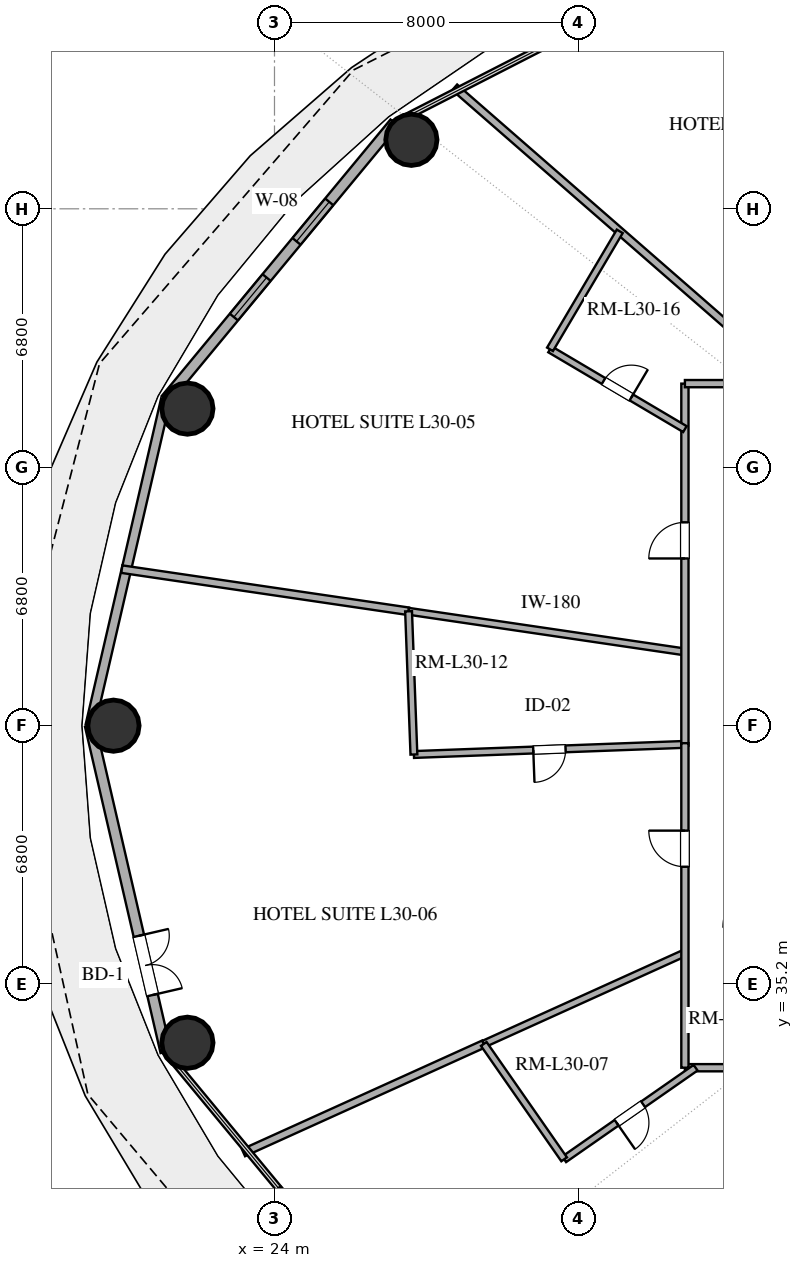
"""IFC4 building model, lengths in metres.
Left out: names, types, materials, properties, quantities, classifications, styles, units other than length and angle.
Written with IfcOpenShell. Run it as: python <this file> out.ifc"""

import sys

from ifc_helpers import new_model, si_unit, direction, frame, frame_2d, origin, origin_2d, place, context, subcontext, project, spatial, rectangle, hollow_circle, extrude, element, fill, save


model = new_model("IFC4")
c1 = context("Model", 3, precision=1e-05, world=origin(), true_north=direction((0.0, 1.0)))
c2 = subcontext(c1, "Body", "Model", "MODEL_VIEW")
j1 = project(units=[si_unit("LENGTHUNIT", "METRE"), si_unit("PLANEANGLEUNIT", "RADIAN")], contexts=[c1])
p1 = place(None, origin())
s1 = spatial("IfcSite", under=j1, at=p1, CompositionType="ELEMENT")
p2 = place(p1, origin())
s2 = spatial("IfcBuilding", under=s1, at=p2, CompositionType="ELEMENT")
p3 = place(p2, frame((0.0, 0.0, 120.0)))
s3 = spatial("IfcBuildingStorey", under=s2, at=p3, CompositionType="ELEMENT", Elevation=120.0)
for number, where, z_axis, x_axis in (
    (1, (27.602, 57.415, 0.0), (0.0, 0.0, 1.0), (1.0, 0.0, 0.0)),
    (2, (21.709, 50.343, 0.0), (0.0, 0.0, 1.0), (1.0, 0.0, 0.0)),
    (3, (19.763, 42.0, 0.0), (0.0, 0.0, 1.0), (1.0, 0.0, 0.0)),
    (4, (21.709, 33.657, 0.0), (0.0, 0.0, 1.0), (1.0, 0.0, 0.0)),
):
    element("IfcColumn", number, at=place(p3, frame(where, z_axis=z_axis, x_axis=x_axis)), inside=s3, PredefinedType="COLUMN", context=c2, shape_type="SweptSolid", body=[
        extrude(hollow_circle(Radius=0.675, WallThickness=0.036, at=origin_2d()), origin(), (0.0, 0.0, 1.0), 3.38),
    ])
p4 = place(p3, frame((27.16, 57.86, 0.0), z_axis=(0.0, 0.0, 1.0), x_axis=(-0.637505817448, -0.770445541696, 0.0)))
e5 = element("IfcWall", 5, at=p4, inside=s3, PredefinedType="SOLIDWALL", context=c2, shape_type="SweptSolid", body=[
    extrude(rectangle(XDim=9.445, YDim=0.28, at=frame_2d((4.723, 0.0))), origin(), (0.0, 0.0, 1.0), 3.38),
])
p5 = place(p4, frame((2.697, 0.0, 0.85)))
e6 = element("IfcOpeningElement", 6, at=p5, cuts=e5, PredefinedType="OPENING", context=c2, shape_type="SweptSolid", body=[
    extrude(rectangle(XDim=1.35, YDim=1.8, at=frame_2d((0.675, 0.9))), frame((0.0, 0.15, 0.0), z_axis=(0.0, -1.0, 0.0), x_axis=(1.0, 0.0, 0.0)), (0.0, 0.0, 1.0), 0.3),
])
p6 = place(p4, frame((5.282, 0.0, 0.85)))
e7 = element("IfcOpeningElement", 7, at=p6, cuts=e5, PredefinedType="OPENING", context=c2, shape_type="SweptSolid", body=[
    extrude(rectangle(XDim=1.35, YDim=1.8, at=frame_2d((0.675, 0.9))), frame((0.0, 0.15, 0.0), z_axis=(0.0, -1.0, 0.0), x_axis=(1.0, 0.0, 0.0)), (0.0, 0.0, 1.0), 0.3),
])
p7 = place(p3, frame((21.139, 50.583, 0.0), z_axis=(0.0, 0.0, 1.0), x_axis=(-0.22558597182, -0.974223264616, 0.0)))
e8 = element("IfcWall", 8, at=p7, inside=s3, PredefinedType="SOLIDWALL", context=c2, shape_type="SweptSolid", body=[
    extrude(rectangle(XDim=8.811, YDim=0.25, at=frame_2d((4.405, 0.0))), origin(), (0.0, 0.0, 1.0), 3.38),
])
p8 = place(p3, frame((19.151, 42.0, 0.0), z_axis=(0.0, 0.0, 1.0), x_axis=(0.22558597182, -0.974223264616, 0.0)))
e9 = element("IfcWall", 9, at=p8, inside=s3, PredefinedType="SOLIDWALL", context=c2, shape_type="SweptSolid", body=[
    extrude(rectangle(XDim=8.811, YDim=0.28, at=frame_2d((4.405, 0.0))), origin(), (0.0, 0.0, 1.0), 3.38),
])
p9 = place(p8, frame((5.675, 0.0, 0.0)))
e10 = element("IfcOpeningElement", 10, at=p9, cuts=e9, PredefinedType="OPENING", context=c2, shape_type="SweptSolid", body=[
    extrude(rectangle(XDim=1.6, YDim=2.25, at=frame_2d((0.8, 1.125))), frame((0.0, 0.15, 0.0), z_axis=(0.0, -1.0, 0.0), x_axis=(1.0, 0.0, 0.0)), (0.0, 0.0, 1.0), 0.3),
])
p10 = place(p3, frame((35.037, 21.969, 0.0), z_axis=(0.0, 0.0, 1.0), x_axis=(0.543298274368, 0.839539745973, 0.0)))
e11 = element("IfcWall", 11, at=p10, inside=s3, PredefinedType="PARTITIONING", context=c2, shape_type="SweptSolid", body=[
    extrude(rectangle(XDim=13.139, YDim=0.2, at=frame_2d((6.57, 0.0))), origin(), (0.0, 0.0, 1.0), 2.74),
])
p11 = place(p3, frame((19.982, 46.119, 0.0), z_axis=(0.0, 0.0, 1.0), x_axis=(0.989365774641, -0.14544883626, 0.0)))
e12 = element("IfcWall", 12, at=p11, inside=s3, PredefinedType="PARTITIONING", context=c2, shape_type="SweptSolid", body=[
    extrude(rectangle(XDim=7.627, YDim=0.2, at=frame_2d((3.813, 0.0))), origin(), (0.0, 0.0, 1.0), 2.74),
])
p12 = place(p3, frame((27.528, 45.01, 0.0), z_axis=(0.0, 0.0, 1.0), x_axis=(0.989364619243, -0.145456695238, 0.0)))
e13 = element("IfcWall", 13, at=p12, inside=s3, PredefinedType="PLUMBINGWALL", context=c2, shape_type="SweptSolid", body=[
    extrude(rectangle(XDim=7.35, YDim=0.18, at=frame_2d((3.675, 0.0))), origin(), (0.0, 0.0, 1.0), 2.74),
])
p13 = place(p3, frame((49.671, 33.0, 0.0), z_axis=(0.0, 0.0, 1.0), x_axis=(-1.0, 0.0, 0.0)))
e14 = element("IfcWall", 14, at=p13, inside=s3, PredefinedType="PARTITIONING", context=c2, shape_type="SweptSolid", body=[
    extrude(rectangle(XDim=14.871, YDim=0.19, at=frame_2d((7.436, 0.0))), origin(), (0.0, 0.0, 1.0), 2.74),
])
p14 = place(p13, frame((10.576, 0.0, 0.0)))
e15 = element("IfcOpeningElement", 15, at=p14, cuts=e14, PredefinedType="OPENING", context=c2, shape_type="SweptSolid", body=[
    extrude(rectangle(XDim=0.95, YDim=2.15, at=frame_2d((0.475, 1.075))), frame((0.0, 0.105, 0.0), z_axis=(0.0, -1.0, 0.0), x_axis=(1.0, 0.0, 0.0)), (0.0, 0.0, 1.0), 0.21),
])
p15 = place(p13, frame((4.101, 0.0, 0.0)))
e16 = element("IfcOpeningElement", 16, at=p15, cuts=e14, PredefinedType="OPENING", context=c2, shape_type="SweptSolid", body=[
    extrude(rectangle(XDim=1.0, YDim=2.2, at=frame_2d((0.5, 1.1))), frame((0.0, 0.105, 0.0), z_axis=(0.0, -1.0, 0.0), x_axis=(1.0, 0.0, 0.0)), (0.0, 0.0, 1.0), 0.21),
])
p16 = place(p3, frame((34.8, 41.508, 0.0), z_axis=(0.0, 0.0, 1.0), x_axis=(-0.999305711591, -0.037257144028, 0.0)))
e17 = element("IfcWall", 17, at=p16, inside=s3, PredefinedType="PLUMBINGWALL", context=c2, shape_type="SweptSolid", body=[
    extrude(rectangle(XDim=7.136, YDim=0.18, at=frame_2d((3.568, 0.0))), origin(), (0.0, 0.0, 1.0), 2.74),
])
p17 = place(p16, frame((3.143, 0.0, 0.0)))
e18 = element("IfcOpeningElement", 18, at=p17, cuts=e17, PredefinedType="OPENING", context=c2, shape_type="SweptSolid", body=[
    extrude(rectangle(XDim=0.85, YDim=2.1, at=frame_2d((0.425, 1.05))), frame((0.0, 0.1, 0.0), z_axis=(0.0, -1.0, 0.0), x_axis=(1.0, 0.0, 0.0)), (0.0, 0.0, 1.0), 0.2),
])
p18 = place(p3, frame((23.185, 30.762, 0.0), z_axis=(0.0, 0.0, 1.0), x_axis=(0.910940213411, 0.412538395292, 0.0)))
e19 = element("IfcWall", 19, at=p18, inside=s3, PredefinedType="PARTITIONING", context=c2, shape_type="SweptSolid", body=[
    extrude(rectangle(XDim=6.941, YDim=0.2, at=frame_2d((3.47, 0.0))), origin(), (0.0, 0.0, 1.0), 2.74),
])
p19 = place(p3, frame((37.68, 51.0, 0.0), z_axis=(0.0, 0.0, 1.0), x_axis=(-0.753659518717, 0.657265037749, 0.0)))
e20 = element("IfcWall", 20, at=p19, inside=s3, PredefinedType="PARTITIONING", context=c2, shape_type="SweptSolid", body=[
    extrude(rectangle(XDim=11.861, YDim=0.2, at=frame_2d((5.93, 0.0))), origin(), (0.0, 0.0, 1.0), 2.74),
])
p20 = place(p3, frame((34.8, 41.476, 0.0), z_axis=(0.0, 0.0, 1.0), x_axis=(0.0, 1.0, 0.0)))
e21 = element("IfcWall", 21, at=p20, inside=s3, PredefinedType="PARTITIONING", context=c2, shape_type="SweptSolid", body=[
    extrude(rectangle(XDim=9.524, YDim=0.19, at=frame_2d((4.762, 0.0))), origin(), (0.0, 0.0, 1.0), 2.74),
])
p21 = place(p20, frame((4.924, 0.0, 0.0)))
e22 = element("IfcOpeningElement", 22, at=p21, cuts=e21, PredefinedType="OPENING", context=c2, shape_type="SweptSolid", body=[
    extrude(rectangle(XDim=0.95, YDim=2.15, at=frame_2d((0.475, 1.075))), frame((0.0, 0.105, 0.0), z_axis=(0.0, -1.0, 0.0), x_axis=(1.0, 0.0, 0.0)), (0.0, 0.0, 1.0), 0.21),
])
p22 = place(p3, frame((34.8, 51.0, 0.0), z_axis=(0.0, 0.0, 1.0), x_axis=(1.0, 0.0, 0.0)))
e23 = element("IfcWall", 23, at=p22, inside=s3, PredefinedType="PARTITIONING", context=c2, shape_type="SweptSolid", body=[
    extrude(rectangle(XDim=10.622, YDim=0.19, at=frame_2d((5.311, 0.0))), origin(), (0.0, 0.0, 1.0), 2.74),
])
p23 = place(p22, frame((5.297, 0.0, 0.0)))
e24 = element("IfcOpeningElement", 24, at=p23, cuts=e23, PredefinedType="OPENING", context=c2, shape_type="SweptSolid", body=[
    extrude(rectangle(XDim=0.95, YDim=2.15, at=frame_2d((0.475, 1.075))), frame((0.0, 0.105, 0.0), z_axis=(0.0, -1.0, 0.0), x_axis=(1.0, 0.0, 0.0)), (0.0, 0.0, 1.0), 0.21),
])
p24 = place(p3, frame((29.507, 33.625, 0.0), z_axis=(0.0, 0.0, 1.0), x_axis=(0.910959840523, 0.412495053248, 0.0)))
e25 = element("IfcWall", 25, at=p24, inside=s3, PredefinedType="PLUMBINGWALL", context=c2, shape_type="SweptSolid", body=[
    extrude(rectangle(XDim=5.81, YDim=0.18, at=frame_2d((2.905, 0.0))), origin(), (0.0, 0.0, 1.0), 2.74),
])
p25 = place(p3, frame((34.8, 33.0, 0.0), z_axis=(0.0, 0.0, 1.0), x_axis=(0.0, 1.0, 0.0)))
e26 = element("IfcWall", 26, at=p25, inside=s3, PredefinedType="PARTITIONING", context=c2, shape_type="SweptSolid", body=[
    extrude(rectangle(XDim=8.54, YDim=0.19, at=frame_2d((4.27, 0.0))), origin(), (0.0, 0.0, 1.0), 2.74),
])
p26 = place(p25, frame((5.288, 0.0, 0.0)))
e27 = element("IfcOpeningElement", 27, at=p26, cuts=e26, PredefinedType="OPENING", context=c2, shape_type="SweptSolid", body=[
    extrude(rectangle(XDim=0.95, YDim=2.15, at=frame_2d((0.475, 1.075))), frame((0.0, 0.105, 0.0), z_axis=(0.0, -1.0, 0.0), x_axis=(1.0, 0.0, 0.0)), (0.0, 0.0, 1.0), 0.21),
])
p27 = place(p3, frame((35.081, 33.0, 0.0), z_axis=(0.0, 0.0, 1.0), x_axis=(-0.820508449427, -0.571634397512, 0.0)))
e28 = element("IfcWall", 28, at=p27, inside=s3, PredefinedType="PLUMBINGWALL", context=c2, shape_type="SweptSolid", body=[
    extrude(rectangle(XDim=4.216, YDim=0.18, at=frame_2d((2.108, 0.0))), origin(), (0.0, 0.0, 1.0), 2.74),
])
p28 = place(p27, frame((1.683, 0.0, 0.0)))
e29 = element("IfcOpeningElement", 29, at=p28, cuts=e28, PredefinedType="OPENING", context=c2, shape_type="SweptSolid", body=[
    extrude(rectangle(XDim=0.85, YDim=2.1, at=frame_2d((0.425, 1.05))), frame((0.0, 0.1, 0.0), z_axis=(0.0, -1.0, 0.0), x_axis=(1.0, 0.0, 0.0)), (0.0, 0.0, 1.0), 0.2),
])
p29 = place(p3, frame((31.25, 51.902, 0.0), z_axis=(0.0, 0.0, 1.0), x_axis=(0.860833406846, -0.508886869214, 0.0)))
e30 = element("IfcWall", 30, at=p29, inside=s3, PredefinedType="PLUMBINGWALL", context=c2, shape_type="SweptSolid", body=[
    extrude(rectangle(XDim=4.124, YDim=0.18, at=frame_2d((2.062, 0.0))), origin(), (0.0, 0.0, 1.0), 2.74),
])
p30 = place(p29, frame((1.637, 0.0, 0.0)))
e31 = element("IfcOpeningElement", 31, at=p30, cuts=e30, PredefinedType="OPENING", context=c2, shape_type="SweptSolid", body=[
    extrude(rectangle(XDim=0.85, YDim=2.1, at=frame_2d((0.425, 1.05))), frame((0.0, 0.1, 0.0), z_axis=(0.0, -1.0, 0.0), x_axis=(1.0, 0.0, 0.0)), (0.0, 0.0, 1.0), 0.2),
])
p31 = place(p3, frame((27.669, 41.242, 0.0), z_axis=(0.0, 0.0, 1.0), x_axis=(-0.037294239527, 0.999304327869, 0.0)))
e32 = element("IfcWall", 32, at=p31, inside=s3, PredefinedType="PLUMBINGWALL", context=c2, shape_type="SweptSolid", body=[
    extrude(rectangle(XDim=3.771, YDim=0.18, at=frame_2d((1.885, 0.0))), origin(), (0.0, 0.0, 1.0), 2.74),
])
p32 = place(p3, frame((31.622, 30.59, 0.0), z_axis=(0.0, 0.0, 1.0), x_axis=(-0.571609603384, 0.820525722521, 0.0)))
e33 = element("IfcWall", 33, at=p32, inside=s3, PredefinedType="PLUMBINGWALL", context=c2, shape_type="SweptSolid", body=[
    extrude(rectangle(XDim=3.7, YDim=0.18, at=frame_2d((1.85, 0.0))), origin(), (0.0, 0.0, 1.0), 2.74),
])
p33 = place(p3, frame((33.085, 55.007, 0.0), z_axis=(0.0, 0.0, 1.0), x_axis=(-0.508909491775, -0.860820032981, 0.0)))
e34 = element("IfcWall", 34, at=p33, inside=s3, PredefinedType="PLUMBINGWALL", context=c2, shape_type="SweptSolid", body=[
    extrude(rectangle(XDim=3.606, YDim=0.18, at=frame_2d((1.803, 0.0))), origin(), (0.0, 0.0, 1.0), 2.74),
])
p34 = place(p5, origin())
e35 = element("IfcWindow", 35, at=p34, inside=s3, PartitioningType="SINGLE_PANEL", PredefinedType="WINDOW", context=c2, shape_type="SweptSolid", body=[
    extrude(rectangle(XDim=1.35, YDim=1.8, at=frame_2d((0.675, 0.9))), frame((0.0, 0.03, 0.0), z_axis=(0.0, -1.0, 0.0), x_axis=(1.0, 0.0, 0.0)), (0.0, 0.0, 1.0), 0.06),
])
fill(e6, e35)
p35 = place(p6, origin())
e36 = element("IfcWindow", 36, at=p35, inside=s3, PartitioningType="SINGLE_PANEL", PredefinedType="WINDOW", context=c2, shape_type="SweptSolid", body=[
    extrude(rectangle(XDim=1.35, YDim=1.8, at=frame_2d((0.675, 0.9))), frame((0.0, 0.03, 0.0), z_axis=(0.0, -1.0, 0.0), x_axis=(1.0, 0.0, 0.0)), (0.0, 0.0, 1.0), 0.06),
])
fill(e7, e36)
p36 = place(p9, origin())
e37 = element("IfcDoor", 37, at=p36, inside=s3, OperationType="DOUBLE_DOOR_SINGLE_SWING", PredefinedType="DOOR", context=c2, shape_type="SweptSolid", body=[
    extrude(rectangle(XDim=1.6, YDim=2.25, at=frame_2d((0.8, 1.125))), frame((0.0, 0.025, 0.0), z_axis=(0.0, -1.0, 0.0), x_axis=(1.0, 0.0, 0.0)), (0.0, 0.0, 1.0), 0.05),
])
fill(e10, e37)
p37 = place(p17, origin())
e38 = element("IfcDoor", 38, at=p37, inside=s3, OperationType="SINGLE_SWING_RIGHT", PredefinedType="DOOR", context=c2, shape_type="SweptSolid", body=[
    extrude(rectangle(XDim=0.85, YDim=2.1, at=frame_2d((0.425, 1.05))), frame((0.0, 0.025, 0.0), z_axis=(0.0, -1.0, 0.0), x_axis=(1.0, 0.0, 0.0)), (0.0, 0.0, 1.0), 0.05),
])
fill(e18, e38)
p38 = place(p21, origin())
e39 = element("IfcDoor", 39, at=p38, inside=s3, OperationType="SINGLE_SWING_LEFT", PredefinedType="DOOR", context=c2, shape_type="SweptSolid", body=[
    extrude(rectangle(XDim=0.95, YDim=2.15, at=frame_2d((0.475, 1.075))), frame((0.0, 0.025, 0.0), z_axis=(0.0, -1.0, 0.0), x_axis=(1.0, 0.0, 0.0)), (0.0, 0.0, 1.0), 0.05),
])
fill(e22, e39)
p39 = place(p26, origin())
e40 = element("IfcDoor", 40, at=p39, inside=s3, OperationType="SINGLE_SWING_RIGHT", PredefinedType="DOOR", context=c2, shape_type="SweptSolid", body=[
    extrude(rectangle(XDim=0.95, YDim=2.15, at=frame_2d((0.475, 1.075))), frame((0.0, 0.025, 0.0), z_axis=(0.0, -1.0, 0.0), x_axis=(1.0, 0.0, 0.0)), (0.0, 0.0, 1.0), 0.05),
])
fill(e27, e40)
p40 = place(p28, origin())
e41 = element("IfcDoor", 41, at=p40, inside=s3, OperationType="SINGLE_SWING_RIGHT", PredefinedType="DOOR", context=c2, shape_type="SweptSolid", body=[
    extrude(rectangle(XDim=0.85, YDim=2.1, at=frame_2d((0.425, 1.05))), frame((0.0, 0.025, 0.0), z_axis=(0.0, -1.0, 0.0), x_axis=(1.0, 0.0, 0.0)), (0.0, 0.0, 1.0), 0.05),
])
fill(e29, e41)
p41 = place(p30, origin())
e42 = element("IfcDoor", 42, at=p41, inside=s3, OperationType="SINGLE_SWING_RIGHT", PredefinedType="DOOR", context=c2, shape_type="SweptSolid", body=[
    extrude(rectangle(XDim=0.85, YDim=2.1, at=frame_2d((0.425, 1.05))), frame((0.0, 0.025, 0.0), z_axis=(0.0, -1.0, 0.0), x_axis=(1.0, 0.0, 0.0)), (0.0, 0.0, 1.0), 0.05),
])
fill(e31, e42)
save(model, sys.argv[1])
